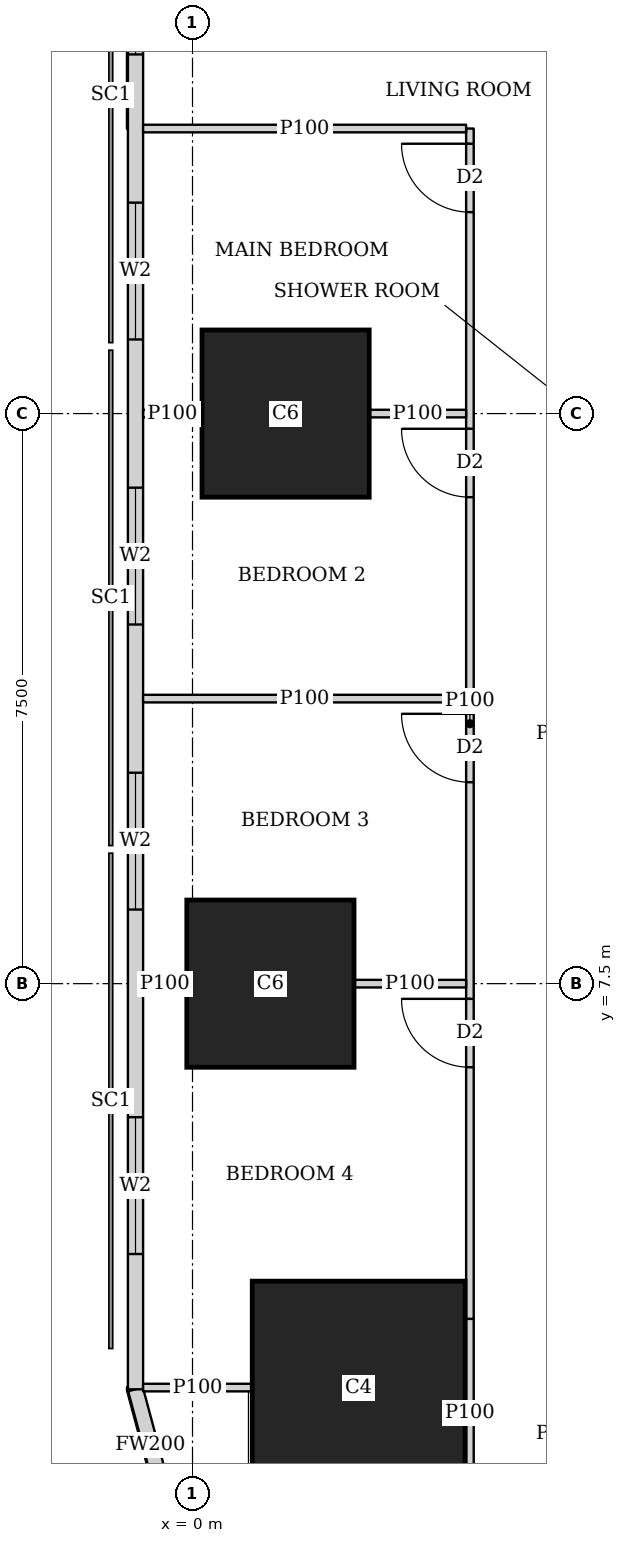
"""IFC4 building model, lengths in metres.
Left out: names, types, materials, properties, quantities, classifications, styles, units other than length and angle.
Written with IfcOpenShell. Run it as: python <this file> out.ifc"""

import sys

from ifc_helpers import new_model, si_unit, direction, frame, frame_2d, origin, origin_2d, place, context, subcontext, project, spatial, rectangle, extrude, element, fill, save


model = new_model("IFC4")
c1 = context("Model", 3, precision=1e-05, world=origin(), true_north=direction((0.0, 1.0)))
c2 = subcontext(c1, "Body", "Model", "MODEL_VIEW")
j1 = project(units=[si_unit("LENGTHUNIT", "METRE"), si_unit("PLANEANGLEUNIT", "RADIAN")], contexts=[c1])
p1 = place(None, origin())
s1 = spatial("IfcSite", under=j1, at=p1, CompositionType="ELEMENT")
p2 = place(p1, origin())
s2 = spatial("IfcBuilding", under=s1, at=p2, CompositionType="ELEMENT")
p3 = place(p2, frame((0.0, 0.0, 77.9)))
s3 = spatial("IfcBuildingStorey", under=s2, at=p3, CompositionType="ELEMENT", Elevation=77.9)
p4 = place(p3, frame((2.186, 2.186, 0.0), z_axis=(0.0, 0.0, 1.0), x_axis=(1.0, 0.0, 0.0)))
e1 = element("IfcColumn", 1, at=p4, inside=s3, PredefinedType="COLUMN", context=c2, shape_type="SweptSolid", body=[
    extrude(rectangle(XDim=2.8, YDim=2.8, at=origin_2d()), origin(), (0.0, 0.0, 1.0), 3.75),
])
for number, where, z_axis, x_axis in (
    (2, (1.025, 7.5, 0.0), (0.0, 0.0, 1.0), (1.0, 0.0, 0.0)),
    (3, (1.225, 15.0, 0.0), (0.0, 0.0, 1.0), (1.0, 0.0, 0.0)),
):
    element("IfcColumn", number, at=place(p3, frame(where, z_axis=z_axis, x_axis=x_axis)), inside=s3, PredefinedType="COLUMN", context=c2, shape_type="SweptSolid", body=[
        extrude(rectangle(XDim=2.2, YDim=2.2, at=origin_2d()), origin(), (0.0, 0.0, 1.0), 3.75),
    ])
p5 = place(p3, frame((-0.75, 42.837, 0.0), z_axis=(0.0, 0.0, 1.0), x_axis=(0.0, -1.0, 0.0)))
e4 = element("IfcWall", 4, at=p5, inside=s3, PredefinedType="SOLIDWALL", context=c2, shape_type="SweptSolid", body=[
    extrude(rectangle(XDim=40.674, YDim=0.2, at=frame_2d((20.337, 0.0))), origin(), (0.0, 0.0, 1.0), 3.5),
])
p6 = place(p5, frame((1.78, 0.0, 0.9)))
e5 = element("IfcOpeningElement", 5, at=p6, cuts=e4, PredefinedType="OPENING", context=c2, shape_type="SweptSolid", body=[
    extrude(rectangle(XDim=1.8, YDim=1.5, at=frame_2d((0.9, 0.75))), frame((0.0, 0.11, 0.0), z_axis=(0.0, -1.0, 0.0), x_axis=(1.0, 0.0, 0.0)), (0.0, 0.0, 1.0), 0.22),
])
p7 = place(p5, frame((6.312, 0.0, 0.9)))
e6 = element("IfcOpeningElement", 6, at=p7, cuts=e4, PredefinedType="OPENING", context=c2, shape_type="SweptSolid", body=[
    extrude(rectangle(XDim=1.8, YDim=1.5, at=frame_2d((0.9, 0.75))), frame((0.0, 0.11, 0.0), z_axis=(0.0, -1.0, 0.0), x_axis=(1.0, 0.0, 0.0)), (0.0, 0.0, 1.0), 0.22),
])
p8 = place(p5, frame((10.062, 0.0, 0.9)))
e7 = element("IfcOpeningElement", 7, at=p8, cuts=e4, PredefinedType="OPENING", context=c2, shape_type="SweptSolid", body=[
    extrude(rectangle(XDim=1.8, YDim=1.5, at=frame_2d((0.9, 0.75))), frame((0.0, 0.11, 0.0), z_axis=(0.0, -1.0, 0.0), x_axis=(1.0, 0.0, 0.0)), (0.0, 0.0, 1.0), 0.22),
])
p9 = place(p5, frame((13.812, 0.0, 0.9)))
e8 = element("IfcOpeningElement", 8, at=p9, cuts=e4, PredefinedType="OPENING", context=c2, shape_type="SweptSolid", body=[
    extrude(rectangle(XDim=1.8, YDim=1.5, at=frame_2d((0.9, 0.75))), frame((0.0, 0.11, 0.0), z_axis=(0.0, -1.0, 0.0), x_axis=(1.0, 0.0, 0.0)), (0.0, 0.0, 1.0), 0.22),
])
p10 = place(p5, frame((17.562, 0.0, 0.9)))
e9 = element("IfcOpeningElement", 9, at=p10, cuts=e4, PredefinedType="OPENING", context=c2, shape_type="SweptSolid", body=[
    extrude(rectangle(XDim=1.8, YDim=1.5, at=frame_2d((0.9, 0.75))), frame((0.0, 0.11, 0.0), z_axis=(0.0, -1.0, 0.0), x_axis=(1.0, 0.0, 0.0)), (0.0, 0.0, 1.0), 0.22),
])
p11 = place(p5, frame((21.312, 0.0, 0.9)))
e10 = element("IfcOpeningElement", 10, at=p11, cuts=e4, PredefinedType="OPENING", context=c2, shape_type="SweptSolid", body=[
    extrude(rectangle(XDim=1.8, YDim=1.5, at=frame_2d((0.9, 0.75))), frame((0.0, 0.11, 0.0), z_axis=(0.0, -1.0, 0.0), x_axis=(1.0, 0.0, 0.0)), (0.0, 0.0, 1.0), 0.22),
])
p12 = place(p5, frame((25.062, 0.0, 0.9)))
e11 = element("IfcOpeningElement", 11, at=p12, cuts=e4, PredefinedType="OPENING", context=c2, shape_type="SweptSolid", body=[
    extrude(rectangle(XDim=1.8, YDim=1.5, at=frame_2d((0.9, 0.75))), frame((0.0, 0.11, 0.0), z_axis=(0.0, -1.0, 0.0), x_axis=(1.0, 0.0, 0.0)), (0.0, 0.0, 1.0), 0.22),
])
p13 = place(p5, frame((28.812, 0.0, 0.9)))
e12 = element("IfcOpeningElement", 12, at=p13, cuts=e4, PredefinedType="OPENING", context=c2, shape_type="SweptSolid", body=[
    extrude(rectangle(XDim=1.8, YDim=1.5, at=frame_2d((0.9, 0.75))), frame((0.0, 0.11, 0.0), z_axis=(0.0, -1.0, 0.0), x_axis=(1.0, 0.0, 0.0)), (0.0, 0.0, 1.0), 0.22),
])
p14 = place(p5, frame((32.562, 0.0, 0.9)))
e13 = element("IfcOpeningElement", 13, at=p14, cuts=e4, PredefinedType="OPENING", context=c2, shape_type="SweptSolid", body=[
    extrude(rectangle(XDim=1.8, YDim=1.5, at=frame_2d((0.9, 0.75))), frame((0.0, 0.11, 0.0), z_axis=(0.0, -1.0, 0.0), x_axis=(1.0, 0.0, 0.0)), (0.0, 0.0, 1.0), 0.22),
])
p15 = place(p5, frame((37.094, 0.0, 0.9)))
e14 = element("IfcOpeningElement", 14, at=p15, cuts=e4, PredefinedType="OPENING", context=c2, shape_type="SweptSolid", body=[
    extrude(rectangle(XDim=1.8, YDim=1.5, at=frame_2d((0.9, 0.75))), frame((0.0, 0.11, 0.0), z_axis=(0.0, -1.0, 0.0), x_axis=(1.0, 0.0, 0.0)), (0.0, 0.0, 1.0), 0.22),
])
p16 = place(p3, frame((-0.75, 2.163, 0.0), z_axis=(0.0, 0.0, 1.0), x_axis=(0.259168954497, -0.965832000415, 0.0)))
e15 = element("IfcWall", 15, at=p16, inside=s3, PredefinedType="SOLIDWALL", context=c2, shape_type="SweptSolid", body=[
    extrude(rectangle(XDim=1.513, YDim=0.2, at=frame_2d((0.756, 0.0))), origin(), (0.0, 0.0, 1.0), 3.5),
])
p17 = place(p3, frame((3.65, 0.604, 0.0), z_axis=(0.0, 0.0, 1.0), x_axis=(0.0, 1.0, 0.0)))
e16 = element("IfcWall", 16, at=p17, inside=s3, PredefinedType="PARTITIONING", context=c2, shape_type="SweptSolid", body=[
    extrude(rectangle(XDim=2.486, YDim=0.1, at=frame_2d((1.243, 0.0))), origin(), (0.0, 0.0, 1.0), 2.05),
])
p18 = place(p3, frame((3.65, 3.09, 0.0), z_axis=(0.0, 0.0, 1.0), x_axis=(0.0, 1.0, 0.0)))
e17 = element("IfcWall", 17, at=p18, inside=s3, PredefinedType="PARTITIONING", context=c2, shape_type="SweptSolid", body=[
    extrude(rectangle(XDim=15.66, YDim=0.1, at=frame_2d((7.83, 0.0))), origin(), (0.0, 0.0, 1.0), 3.5),
])
p19 = place(p18, frame((14.56, 0.0, 0.0)))
e18 = element("IfcOpeningElement", 18, at=p19, cuts=e17, PredefinedType="OPENING", context=c2, shape_type="SweptSolid", body=[
    extrude(rectangle(XDim=0.9, YDim=2.1, at=frame_2d((0.45, 1.05))), frame((0.0, 0.06, 0.0), z_axis=(0.0, -1.0, 0.0), x_axis=(1.0, 0.0, 0.0)), (0.0, 0.0, 1.0), 0.12),
])
p20 = place(p18, frame((10.81, 0.0, 0.0)))
e19 = element("IfcOpeningElement", 19, at=p20, cuts=e17, PredefinedType="OPENING", context=c2, shape_type="SweptSolid", body=[
    extrude(rectangle(XDim=0.9, YDim=2.1, at=frame_2d((0.45, 1.05))), frame((0.0, 0.06, 0.0), z_axis=(0.0, -1.0, 0.0), x_axis=(1.0, 0.0, 0.0)), (0.0, 0.0, 1.0), 0.12),
])
p21 = place(p18, frame((7.06, 0.0, 0.0)))
e20 = element("IfcOpeningElement", 20, at=p21, cuts=e17, PredefinedType="OPENING", context=c2, shape_type="SweptSolid", body=[
    extrude(rectangle(XDim=0.9, YDim=2.1, at=frame_2d((0.45, 1.05))), frame((0.0, 0.06, 0.0), z_axis=(0.0, -1.0, 0.0), x_axis=(1.0, 0.0, 0.0)), (0.0, 0.0, 1.0), 0.12),
])
p22 = place(p18, frame((3.31, 0.0, 0.0)))
e21 = element("IfcOpeningElement", 21, at=p22, cuts=e17, PredefinedType="OPENING", context=c2, shape_type="SweptSolid", body=[
    extrude(rectangle(XDim=0.9, YDim=2.1, at=frame_2d((0.45, 1.05))), frame((0.0, 0.06, 0.0), z_axis=(0.0, -1.0, 0.0), x_axis=(1.0, 0.0, 0.0)), (0.0, 0.0, 1.0), 0.12),
])
p23 = place(p3, frame((-0.65, 2.186, 0.0), z_axis=(0.0, 0.0, 1.0), x_axis=(1.0, 0.0, 0.0)))
e22 = element("IfcWall", 22, at=p23, inside=s3, PredefinedType="PARTITIONING", context=c2, shape_type="SweptSolid", body=[
    extrude(rectangle(XDim=1.435, YDim=0.1, at=frame_2d((0.717, 0.0))), origin(), (0.0, 0.0, 1.0), 3.5),
])
p24 = place(p3, frame((-0.65, 7.5, 0.0), z_axis=(0.0, 0.0, 1.0), x_axis=(1.0, 0.0, 0.0)))
e23 = element("IfcWall", 23, at=p24, inside=s3, PredefinedType="PARTITIONING", context=c2, shape_type="SweptSolid", body=[
    extrude(rectangle(XDim=0.574, YDim=0.1, at=frame_2d((0.287, 0.0))), origin(), (0.0, 0.0, 1.0), 2.05),
])
p25 = place(p3, frame((2.126, 7.5, 0.0), z_axis=(0.0, 0.0, 1.0), x_axis=(1.0, 0.0, 0.0)))
e24 = element("IfcWall", 24, at=p25, inside=s3, PredefinedType="PARTITIONING", context=c2, shape_type="SweptSolid", body=[
    extrude(rectangle(XDim=1.474, YDim=0.1, at=frame_2d((0.737, 0.0))), origin(), (0.0, 0.0, 1.0), 2.05),
])
p26 = place(p3, frame((-0.65, 11.25, 0.0), z_axis=(0.0, 0.0, 1.0), x_axis=(1.0, 0.0, 0.0)))
e25 = element("IfcWall", 25, at=p26, inside=s3, PredefinedType="PARTITIONING", context=c2, shape_type="SweptSolid", body=[
    extrude(rectangle(XDim=4.25, YDim=0.1, at=frame_2d((2.125, 0.0))), origin(), (0.0, 0.0, 1.0), 2.2),
])
p27 = place(p3, frame((-0.65, 15.0, 0.0), z_axis=(0.0, 0.0, 1.0), x_axis=(1.0, 0.0, 0.0)))
e26 = element("IfcWall", 26, at=p27, inside=s3, PredefinedType="PARTITIONING", context=c2, shape_type="SweptSolid", body=[
    extrude(rectangle(XDim=0.774, YDim=0.1, at=frame_2d((0.387, 0.0))), origin(), (0.0, 0.0, 1.0), 3.5),
])
p28 = place(p3, frame((2.326, 15.0, 0.0), z_axis=(0.0, 0.0, 1.0), x_axis=(1.0, 0.0, 0.0)))
e27 = element("IfcWall", 27, at=p28, inside=s3, PredefinedType="PARTITIONING", context=c2, shape_type="SweptSolid", body=[
    extrude(rectangle(XDim=1.274, YDim=0.1, at=frame_2d((0.637, 0.0))), origin(), (0.0, 0.0, 1.0), 3.5),
])
p29 = place(p3, frame((-0.65, 18.75, 0.0), z_axis=(0.0, 0.0, 1.0), x_axis=(1.0, 0.0, 0.0)))
e28 = element("IfcWall", 28, at=p29, inside=s3, PredefinedType="PARTITIONING", context=c2, shape_type="SweptSolid", body=[
    extrude(rectangle(XDim=4.25, YDim=0.1, at=frame_2d((2.125, 0.0))), origin(), (0.0, 0.0, 1.0), 2.2),
])
p30 = place(p11, origin())
e29 = element("IfcWindow", 29, at=p30, inside=s3, PartitioningType="SINGLE_PANEL", PredefinedType="WINDOW", context=c2, shape_type="SweptSolid", body=[
    extrude(rectangle(XDim=1.8, YDim=1.5, at=frame_2d((0.9, 0.75))), frame((0.0, 0.03, 0.0), z_axis=(0.0, -1.0, 0.0), x_axis=(1.0, 0.0, 0.0)), (0.0, 0.0, 1.0), 0.06),
])
fill(e10, e29)
p31 = place(p12, origin())
e30 = element("IfcWindow", 30, at=p31, inside=s3, PartitioningType="SINGLE_PANEL", PredefinedType="WINDOW", context=c2, shape_type="SweptSolid", body=[
    extrude(rectangle(XDim=1.8, YDim=1.5, at=frame_2d((0.9, 0.75))), frame((0.0, 0.03, 0.0), z_axis=(0.0, -1.0, 0.0), x_axis=(1.0, 0.0, 0.0)), (0.0, 0.0, 1.0), 0.06),
])
fill(e11, e30)
p32 = place(p13, origin())
e31 = element("IfcWindow", 31, at=p32, inside=s3, PartitioningType="SINGLE_PANEL", PredefinedType="WINDOW", context=c2, shape_type="SweptSolid", body=[
    extrude(rectangle(XDim=1.8, YDim=1.5, at=frame_2d((0.9, 0.75))), frame((0.0, 0.03, 0.0), z_axis=(0.0, -1.0, 0.0), x_axis=(1.0, 0.0, 0.0)), (0.0, 0.0, 1.0), 0.06),
])
fill(e12, e31)
p33 = place(p14, origin())
e32 = element("IfcWindow", 32, at=p33, inside=s3, PartitioningType="SINGLE_PANEL", PredefinedType="WINDOW", context=c2, shape_type="SweptSolid", body=[
    extrude(rectangle(XDim=1.8, YDim=1.5, at=frame_2d((0.9, 0.75))), frame((0.0, 0.03, 0.0), z_axis=(0.0, -1.0, 0.0), x_axis=(1.0, 0.0, 0.0)), (0.0, 0.0, 1.0), 0.06),
])
fill(e13, e32)
p34 = place(p15, origin())
e33 = element("IfcWindow", 33, at=p34, inside=s3, PartitioningType="SINGLE_PANEL", PredefinedType="WINDOW", context=c2, shape_type="SweptSolid", body=[
    extrude(rectangle(XDim=1.8, YDim=1.5, at=frame_2d((0.9, 0.75))), frame((0.0, 0.03, 0.0), z_axis=(0.0, -1.0, 0.0), x_axis=(1.0, 0.0, 0.0)), (0.0, 0.0, 1.0), 0.06),
])
fill(e14, e33)
p35 = place(p19, origin())
e34 = element("IfcDoor", 34, at=p35, inside=s3, OperationType="SINGLE_SWING_RIGHT", PredefinedType="DOOR", context=c2, shape_type="SweptSolid", body=[
    extrude(rectangle(XDim=0.9, YDim=2.1, at=frame_2d((0.45, 1.05))), frame((0.0, 0.025, 0.0), z_axis=(0.0, -1.0, 0.0), x_axis=(1.0, 0.0, 0.0)), (0.0, 0.0, 1.0), 0.05),
])
fill(e18, e34)
p36 = place(p20, origin())
e35 = element("IfcDoor", 35, at=p36, inside=s3, OperationType="SINGLE_SWING_RIGHT", PredefinedType="DOOR", context=c2, shape_type="SweptSolid", body=[
    extrude(rectangle(XDim=0.9, YDim=2.1, at=frame_2d((0.45, 1.05))), frame((0.0, 0.025, 0.0), z_axis=(0.0, -1.0, 0.0), x_axis=(1.0, 0.0, 0.0)), (0.0, 0.0, 1.0), 0.05),
])
fill(e19, e35)
p37 = place(p21, origin())
e36 = element("IfcDoor", 36, at=p37, inside=s3, OperationType="SINGLE_SWING_RIGHT", PredefinedType="DOOR", context=c2, shape_type="SweptSolid", body=[
    extrude(rectangle(XDim=0.9, YDim=2.1, at=frame_2d((0.45, 1.05))), frame((0.0, 0.025, 0.0), z_axis=(0.0, -1.0, 0.0), x_axis=(1.0, 0.0, 0.0)), (0.0, 0.0, 1.0), 0.05),
])
fill(e20, e36)
p38 = place(p22, origin())
e37 = element("IfcDoor", 37, at=p38, inside=s3, OperationType="SINGLE_SWING_RIGHT", PredefinedType="DOOR", context=c2, shape_type="SweptSolid", body=[
    extrude(rectangle(XDim=0.9, YDim=2.1, at=frame_2d((0.45, 1.05))), frame((0.0, 0.025, 0.0), z_axis=(0.0, -1.0, 0.0), x_axis=(1.0, 0.0, 0.0)), (0.0, 0.0, 1.0), 0.05),
])
fill(e21, e37)
save(model, sys.argv[1])
